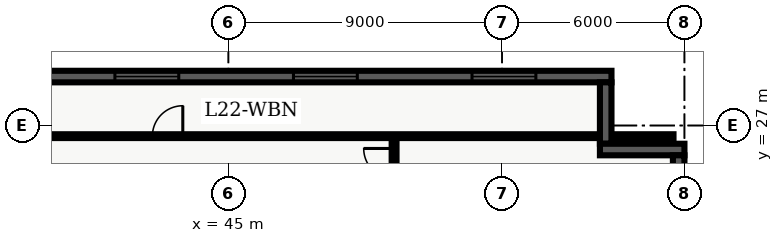
"""IFC4 building model, lengths in metres.
Left out: names, types, materials, properties, quantities, classifications, styles, units other than length and angle.
Written with IfcOpenShell. Run it as: python <this file> out.ifc"""

import sys

from ifc_helpers import new_model, entity, si_unit, converted_unit, direction, frame, origin_with_axes, origin_2d_with_axis, place, context, subcontext, project, spatial, polyline, rectangle, outline, extrude, element, fill, save


model = new_model("IFC4")
c1 = context("Model", 3, precision=1e-05, world=origin_with_axes(), true_north=direction((0.0, 1.0)))
c2 = subcontext(c1, "Body", "Model", "MODEL_VIEW")
j1 = project(units=[si_unit("LENGTHUNIT", "METRE"), converted_unit("PLANEANGLEUNIT", "DEGREE", entity("IfcPlaneAngleMeasure", 0.017), si_unit("PLANEANGLEUNIT", "RADIAN"), dimensions=[0, 0, 0, 0, 0, 0, 0])], contexts=[c1])
p1 = place(None, origin_with_axes())
s1 = spatial("IfcSite", under=j1, at=p1, CompositionType="ELEMENT")
p2 = place(p1, origin_with_axes())
s2 = spatial("IfcBuilding", under=s1, at=p2, CompositionType="ELEMENT")
p3 = place(p2, frame((0.0, 0.0, 93.0), z_axis=(0.0, 0.0, 1.0), x_axis=(1.0, 0.0, 0.0)))
s3 = spatial("IfcBuildingStorey", under=s2, at=p3, CompositionType="ELEMENT", Elevation=93.0)
p4 = place(p3, frame((50.45, 7.85, 0.0), z_axis=(0.0, 0.0, 1.0), x_axis=(0.0, 1.0, 0.0)))
e1 = element("IfcWall", 1, at=p4, inside=s3, PredefinedType="PARTITIONING", context=c2, shape_type="SweptSolid", body=[
    extrude(outline(polyline([(0.0, -0.08), (18.8, -0.08), (18.8, 0.08), (0.0, 0.08), (0.0, -0.08)])), origin_with_axes(), (0.0, 0.0, 1.0), 2.7),
])
p5 = place(p4, frame((6.888, 0.0, 0.0), z_axis=(0.0, 0.0, 1.0), x_axis=(1.0, 0.0, 0.0)))
e2 = element("IfcOpeningElement", 2, at=p5, cuts=e1, PredefinedType="OPENING", context=c2, shape_type="SweptSolid", body=[
    extrude(rectangle(XDim=1.0, YDim=0.18, at=origin_2d_with_axis()), origin_with_axes(), (0.0, 0.0, 1.0), 2.15),
])
p6 = place(p4, frame((12.353, 0.0, 0.0), z_axis=(0.0, 0.0, 1.0), x_axis=(1.0, 0.0, 0.0)))
e3 = element("IfcOpeningElement", 3, at=p6, cuts=e1, PredefinedType="OPENING", context=c2, shape_type="SweptSolid", body=[
    extrude(rectangle(XDim=1.0, YDim=0.18, at=origin_2d_with_axis()), origin_with_axes(), (0.0, 0.0, 1.0), 2.15),
])
p7 = place(p4, frame((17.895, 0.0, 0.0), z_axis=(0.0, 0.0, 1.0), x_axis=(1.0, 0.0, 0.0)))
e4 = element("IfcOpeningElement", 4, at=p7, cuts=e1, PredefinedType="OPENING", context=c2, shape_type="SweptSolid", body=[
    extrude(rectangle(XDim=1.0, YDim=0.18, at=origin_2d_with_axis()), origin_with_axes(), (0.0, 0.0, 1.0), 2.15),
])
p8 = place(p3, frame((38.76, 26.65, 0.0), z_axis=(0.0, 0.0, 1.0), x_axis=(1.0, 0.0, 0.0)))
e5 = element("IfcWall", 5, at=p8, inside=s3, PredefinedType="PARTITIONING", context=c2, shape_type="SweptSolid", body=[
    extrude(outline(polyline([(0.0, -0.062), (20.88, -0.062), (20.88, 0.062), (0.0, 0.062), (0.0, -0.062)])), origin_with_axes(), (0.0, 0.0, 1.0), 2.7),
])
p9 = place(p8, frame((4.24, 0.0, 0.0), z_axis=(0.0, 0.0, 1.0), x_axis=(1.0, 0.0, 0.0)))
e6 = element("IfcOpeningElement", 6, at=p9, cuts=e5, PredefinedType="OPENING", context=c2, shape_type="SweptSolid", body=[
    extrude(rectangle(XDim=1.0, YDim=0.145, at=origin_2d_with_axis()), origin_with_axes(), (0.0, 0.0, 1.0), 2.15),
])
p10 = place(p3, frame((38.78, 28.61, 0.0), z_axis=(0.0, 0.0, 1.0), x_axis=(1.0, 0.0, 0.0)))
e7 = element("IfcWall", 7, at=p10, inside=s3, PredefinedType="SOLIDWALL", context=c2, shape_type="SweptSolid", body=[
    extrude(outline(polyline([(0.0, -0.19), (18.82, -0.19), (18.82, 0.19), (0.0, 0.19), (0.0, -0.19)])), origin_with_axes(), (0.0, 0.0, 1.0), 3.66),
])
p11 = place(p10, frame((3.537, 0.0, 0.45), z_axis=(0.0, 0.0, 1.0), x_axis=(1.0, 0.0, 0.0)))
e8 = element("IfcOpeningElement", 8, at=p11, cuts=e7, PredefinedType="OPENING", context=c2, shape_type="SweptSolid", body=[
    extrude(rectangle(XDim=2.1, YDim=0.4, at=origin_2d_with_axis()), origin_with_axes(), (0.0, 0.0, 1.0), 2.2),
])
p12 = place(p10, frame((9.41, 0.0, 0.45), z_axis=(0.0, 0.0, 1.0), x_axis=(1.0, 0.0, 0.0)))
e9 = element("IfcOpeningElement", 9, at=p12, cuts=e7, PredefinedType="OPENING", context=c2, shape_type="SweptSolid", body=[
    extrude(rectangle(XDim=2.1, YDim=0.4, at=origin_2d_with_axis()), origin_with_axes(), (0.0, 0.0, 1.0), 2.2),
])
p13 = place(p10, frame((15.283, 0.0, 0.45), z_axis=(0.0, 0.0, 1.0), x_axis=(1.0, 0.0, 0.0)))
e10 = element("IfcOpeningElement", 10, at=p13, cuts=e7, PredefinedType="OPENING", context=c2, shape_type="SweptSolid", body=[
    extrude(rectangle(XDim=2.1, YDim=0.4, at=origin_2d_with_axis()), origin_with_axes(), (0.0, 0.0, 1.0), 2.2),
])
p14 = place(p3, frame((57.41, 28.42, 0.0), z_axis=(0.0, 0.0, 1.0), x_axis=(0.0, -1.0, 0.0)))
e11 = element("IfcWall", 11, at=p14, inside=s3, PredefinedType="SOLIDWALL", context=c2, shape_type="SweptSolid", body=[
    extrude(outline(polyline([(0.0, -0.19), (2.02, -0.19), (2.02, 0.19), (0.0, 0.19), (0.0, -0.19)])), origin_with_axes(), (0.0, 0.0, 1.0), 3.66),
])
p15 = place(p3, frame((57.22, 26.21, 0.0), z_axis=(0.0, 0.0, 1.0), x_axis=(1.0, 0.0, 0.0)))
e12 = element("IfcWall", 12, at=p15, inside=s3, PredefinedType="SOLIDWALL", context=c2, shape_type="SweptSolid", body=[
    extrude(outline(polyline([(0.0, -0.19), (2.78, -0.19), (2.78, 0.19), (0.0, 0.19), (0.0, -0.19)])), origin_with_axes(), (0.0, 0.0, 1.0), 3.66),
])
p16 = place(p3, frame((59.81, 26.02, 0.0), z_axis=(0.0, 0.0, 1.0), x_axis=(0.0, -1.0, 0.0)))
e13 = element("IfcWall", 13, at=p16, inside=s3, PredefinedType="SOLIDWALL", context=c2, shape_type="SweptSolid", body=[
    extrude(outline(polyline([(0.0, -0.19), (23.62, -0.19), (23.62, 0.19), (0.0, 0.19), (0.0, -0.19)])), origin_with_axes(), (0.0, 0.0, 1.0), 3.66),
])
p17 = place(p16, frame((20.218, 0.0, 0.45), z_axis=(0.0, 0.0, 1.0), x_axis=(1.0, 0.0, 0.0)))
e14 = element("IfcOpeningElement", 14, at=p17, cuts=e13, PredefinedType="OPENING", context=c2, shape_type="SweptSolid", body=[
    extrude(rectangle(XDim=2.1, YDim=0.4, at=origin_2d_with_axis()), origin_with_axes(), (0.0, 0.0, 1.0), 2.2),
])
p18 = place(p8, frame((4.24, 0.0, 0.0), z_axis=(0.0, 0.0, 1.0), x_axis=(1.0, 0.0, 0.0)))
e15 = element("IfcDoor", 15, at=p18, inside=s3, OperationType="SINGLE_SWING_RIGHT", PredefinedType="DOOR", context=c2, shape_type="SweptSolid", body=[
    extrude(rectangle(XDim=1.0, YDim=0.075, at=origin_2d_with_axis()), origin_with_axes(), (0.0, 0.0, 1.0), 2.15),
])
fill(e6, e15)
p19 = place(p4, frame((17.895, 0.0, 0.0), z_axis=(0.0, 0.0, 1.0), x_axis=(1.0, 0.0, 0.0)))
e16 = element("IfcDoor", 16, at=p19, inside=s3, OperationType="SINGLE_SWING_RIGHT", PredefinedType="DOOR", context=c2, shape_type="SweptSolid", body=[
    extrude(rectangle(XDim=1.0, YDim=0.09, at=origin_2d_with_axis()), origin_with_axes(), (0.0, 0.0, 1.0), 2.15),
])
fill(e4, e16)
p20 = place(p10, frame((3.537, 0.0, 0.45), z_axis=(0.0, 0.0, 1.0), x_axis=(1.0, 0.0, 0.0)))
e17 = element("IfcWindow", 17, at=p20, inside=s3, PredefinedType="WINDOW", context=c2, shape_type="SweptSolid", body=[
    extrude(rectangle(XDim=2.1, YDim=0.09, at=origin_2d_with_axis()), origin_with_axes(), (0.0, 0.0, 1.0), 2.2),
])
fill(e8, e17)
p21 = place(p10, frame((9.41, 0.0, 0.45), z_axis=(0.0, 0.0, 1.0), x_axis=(1.0, 0.0, 0.0)))
e18 = element("IfcWindow", 18, at=p21, inside=s3, PredefinedType="WINDOW", context=c2, shape_type="SweptSolid", body=[
    extrude(rectangle(XDim=2.1, YDim=0.09, at=origin_2d_with_axis()), origin_with_axes(), (0.0, 0.0, 1.0), 2.2),
])
fill(e9, e18)
p22 = place(p10, frame((15.283, 0.0, 0.45), z_axis=(0.0, 0.0, 1.0), x_axis=(1.0, 0.0, 0.0)))
e19 = element("IfcWindow", 19, at=p22, inside=s3, PredefinedType="WINDOW", context=c2, shape_type="SweptSolid", body=[
    extrude(rectangle(XDim=2.1, YDim=0.09, at=origin_2d_with_axis()), origin_with_axes(), (0.0, 0.0, 1.0), 2.2),
])
fill(e10, e19)
save(model, sys.argv[1])
